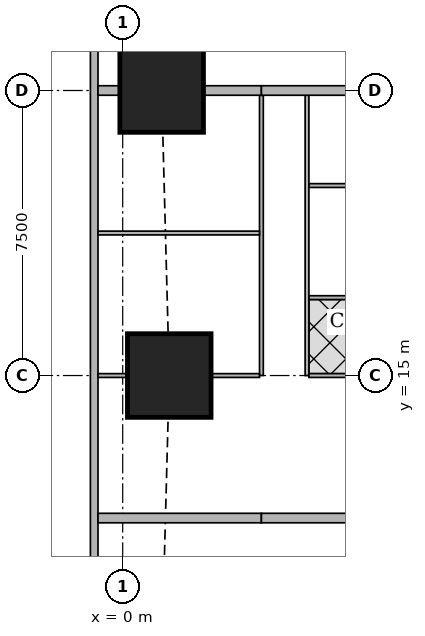
"""IFC4 building model, lengths in metres.
Left out: names, types, materials, properties, quantities, classifications, styles, units other than length and angle.
Written with IfcOpenShell. Run it as: python <this file> out.ifc"""

import sys

from ifc_helpers import new_model, si_unit, direction, frame, frame_2d, origin, origin_2d, place, context, subcontext, project, spatial, rectangle, extrude, element, fill, save


model = new_model("IFC4")
c1 = context("Model", 3, precision=1e-05, world=origin(), true_north=direction((0.0, 1.0)))
c2 = subcontext(c1, "Body", "Model", "MODEL_VIEW")
j1 = project(units=[si_unit("LENGTHUNIT", "METRE"), si_unit("PLANEANGLEUNIT", "RADIAN")], contexts=[c1])
p1 = place(None, origin())
s1 = spatial("IfcSite", under=j1, at=p1, CompositionType="ELEMENT")
p2 = place(p1, origin())
s2 = spatial("IfcBuilding", under=s1, at=p2, CompositionType="ELEMENT")
p3 = place(p2, frame((0.0, 0.0, 111.65)))
s3 = spatial("IfcBuildingStorey", under=s2, at=p3, CompositionType="ELEMENT", Elevation=111.65)
for number, where, z_axis, x_axis in (
    (1, (1.225, 15.0, 0.0), (0.0, 0.0, 1.0), (1.0, 0.0, 0.0)),
    (2, (1.025, 22.5, 0.0), (0.0, 0.0, 1.0), (1.0, 0.0, 0.0)),
):
    element("IfcColumn", number, at=place(p3, frame(where, z_axis=z_axis, x_axis=x_axis)), inside=s3, PredefinedType="COLUMN", context=c2, shape_type="SweptSolid", body=[
        extrude(rectangle(XDim=2.2, YDim=2.2, at=origin_2d()), origin(), (0.0, 0.0, 1.0), 3.75),
    ])
p4 = place(p3, frame((-0.75, 42.837, 0.0), z_axis=(0.0, 0.0, 1.0), x_axis=(0.0, -1.0, 0.0)))
e3 = element("IfcWall", 3, at=p4, inside=s3, PredefinedType="SOLIDWALL", context=c2, shape_type="SweptSolid", body=[
    extrude(rectangle(XDim=40.674, YDim=0.2, at=frame_2d((20.337, 0.0))), origin(), (0.0, 0.0, 1.0), 3.5),
])
p5 = place(p4, frame((1.78, 0.0, 0.9)))
e4 = element("IfcOpeningElement", 4, at=p5, cuts=e3, PredefinedType="OPENING", context=c2, shape_type="SweptSolid", body=[
    extrude(rectangle(XDim=1.8, YDim=1.5, at=frame_2d((0.9, 0.75))), frame((0.0, 0.11, 0.0), z_axis=(0.0, -1.0, 0.0), x_axis=(1.0, 0.0, 0.0)), (0.0, 0.0, 1.0), 0.22),
])
p6 = place(p4, frame((6.312, 0.0, 0.9)))
e5 = element("IfcOpeningElement", 5, at=p6, cuts=e3, PredefinedType="OPENING", context=c2, shape_type="SweptSolid", body=[
    extrude(rectangle(XDim=1.8, YDim=1.5, at=frame_2d((0.9, 0.75))), frame((0.0, 0.11, 0.0), z_axis=(0.0, -1.0, 0.0), x_axis=(1.0, 0.0, 0.0)), (0.0, 0.0, 1.0), 0.22),
])
p7 = place(p4, frame((10.062, 0.0, 0.9)))
e6 = element("IfcOpeningElement", 6, at=p7, cuts=e3, PredefinedType="OPENING", context=c2, shape_type="SweptSolid", body=[
    extrude(rectangle(XDim=1.8, YDim=1.5, at=frame_2d((0.9, 0.75))), frame((0.0, 0.11, 0.0), z_axis=(0.0, -1.0, 0.0), x_axis=(1.0, 0.0, 0.0)), (0.0, 0.0, 1.0), 0.22),
])
p8 = place(p4, frame((13.812, 0.0, 0.9)))
e7 = element("IfcOpeningElement", 7, at=p8, cuts=e3, PredefinedType="OPENING", context=c2, shape_type="SweptSolid", body=[
    extrude(rectangle(XDim=1.8, YDim=1.5, at=frame_2d((0.9, 0.75))), frame((0.0, 0.11, 0.0), z_axis=(0.0, -1.0, 0.0), x_axis=(1.0, 0.0, 0.0)), (0.0, 0.0, 1.0), 0.22),
])
p9 = place(p4, frame((17.562, 0.0, 0.9)))
e8 = element("IfcOpeningElement", 8, at=p9, cuts=e3, PredefinedType="OPENING", context=c2, shape_type="SweptSolid", body=[
    extrude(rectangle(XDim=1.8, YDim=1.5, at=frame_2d((0.9, 0.75))), frame((0.0, 0.11, 0.0), z_axis=(0.0, -1.0, 0.0), x_axis=(1.0, 0.0, 0.0)), (0.0, 0.0, 1.0), 0.22),
])
p10 = place(p4, frame((21.312, 0.0, 0.9)))
e9 = element("IfcOpeningElement", 9, at=p10, cuts=e3, PredefinedType="OPENING", context=c2, shape_type="SweptSolid", body=[
    extrude(rectangle(XDim=1.8, YDim=1.5, at=frame_2d((0.9, 0.75))), frame((0.0, 0.11, 0.0), z_axis=(0.0, -1.0, 0.0), x_axis=(1.0, 0.0, 0.0)), (0.0, 0.0, 1.0), 0.22),
])
p11 = place(p4, frame((25.062, 0.0, 0.9)))
e10 = element("IfcOpeningElement", 10, at=p11, cuts=e3, PredefinedType="OPENING", context=c2, shape_type="SweptSolid", body=[
    extrude(rectangle(XDim=1.8, YDim=1.5, at=frame_2d((0.9, 0.75))), frame((0.0, 0.11, 0.0), z_axis=(0.0, -1.0, 0.0), x_axis=(1.0, 0.0, 0.0)), (0.0, 0.0, 1.0), 0.22),
])
p12 = place(p4, frame((28.812, 0.0, 0.9)))
e11 = element("IfcOpeningElement", 11, at=p12, cuts=e3, PredefinedType="OPENING", context=c2, shape_type="SweptSolid", body=[
    extrude(rectangle(XDim=1.8, YDim=1.5, at=frame_2d((0.9, 0.75))), frame((0.0, 0.11, 0.0), z_axis=(0.0, -1.0, 0.0), x_axis=(1.0, 0.0, 0.0)), (0.0, 0.0, 1.0), 0.22),
])
p13 = place(p4, frame((32.562, 0.0, 0.9)))
e12 = element("IfcOpeningElement", 12, at=p13, cuts=e3, PredefinedType="OPENING", context=c2, shape_type="SweptSolid", body=[
    extrude(rectangle(XDim=1.8, YDim=1.5, at=frame_2d((0.9, 0.75))), frame((0.0, 0.11, 0.0), z_axis=(0.0, -1.0, 0.0), x_axis=(1.0, 0.0, 0.0)), (0.0, 0.0, 1.0), 0.22),
])
p14 = place(p4, frame((37.094, 0.0, 0.9)))
e13 = element("IfcOpeningElement", 13, at=p14, cuts=e3, PredefinedType="OPENING", context=c2, shape_type="SweptSolid", body=[
    extrude(rectangle(XDim=1.8, YDim=1.5, at=frame_2d((0.9, 0.75))), frame((0.0, 0.11, 0.0), z_axis=(0.0, -1.0, 0.0), x_axis=(1.0, 0.0, 0.0)), (0.0, 0.0, 1.0), 0.22),
])
p15 = place(p3, frame((3.65, 15.0, 0.0), z_axis=(0.0, 0.0, 1.0), x_axis=(0.0, 1.0, 0.0)))
e14 = element("IfcWall", 14, at=p15, inside=s3, PredefinedType="PARTITIONING", context=c2, shape_type="SweptSolid", body=[
    extrude(rectangle(XDim=7.375, YDim=0.1, at=frame_2d((3.688, 0.0))), origin(), (0.0, 0.0, 1.0), 3.5),
])
p16 = place(p15, frame((0.2, 0.0, 0.0)))
e15 = element("IfcOpeningElement", 15, at=p16, cuts=e14, PredefinedType="OPENING", context=c2, shape_type="SweptSolid", body=[
    extrude(rectangle(XDim=0.9, YDim=2.1, at=frame_2d((0.45, 1.05))), frame((0.0, 0.06, 0.0), z_axis=(0.0, -1.0, 0.0), x_axis=(1.0, 0.0, 0.0)), (0.0, 0.0, 1.0), 0.12),
])
p17 = place(p15, frame((3.95, 0.0, 0.0)))
e16 = element("IfcOpeningElement", 16, at=p17, cuts=e14, PredefinedType="OPENING", context=c2, shape_type="SweptSolid", body=[
    extrude(rectangle(XDim=0.9, YDim=2.1, at=frame_2d((0.45, 1.05))), frame((0.0, 0.06, 0.0), z_axis=(0.0, -1.0, 0.0), x_axis=(1.0, 0.0, 0.0)), (0.0, 0.0, 1.0), 0.12),
])
p18 = place(p3, frame((4.85, 15.0, 0.0), z_axis=(0.0, 0.0, 1.0), x_axis=(0.0, 1.0, 0.0)))
e17 = element("IfcWall", 17, at=p18, inside=s3, PredefinedType="PARTITIONING", context=c2, shape_type="SweptSolid", body=[
    extrude(rectangle(XDim=7.375, YDim=0.1, at=frame_2d((3.688, 0.0))), origin(), (0.0, 0.0, 1.0), 3.5),
])
p19 = place(p18, frame((0.575, 0.0, 0.0)))
e18 = element("IfcOpeningElement", 18, at=p19, cuts=e17, PredefinedType="OPENING", context=c2, shape_type="SweptSolid", body=[
    extrude(rectangle(XDim=0.9, YDim=2.1, at=frame_2d((0.45, 1.05))), frame((0.0, 0.06, 0.0), z_axis=(0.0, -1.0, 0.0), x_axis=(1.0, 0.0, 0.0)), (0.0, 0.0, 1.0), 0.12),
])
p20 = place(p18, frame((5.799, 0.0, 0.0)))
e19 = element("IfcOpeningElement", 19, at=p20, cuts=e17, PredefinedType="OPENING", context=c2, shape_type="SweptSolid", body=[
    extrude(rectangle(XDim=0.9, YDim=2.1, at=frame_2d((0.45, 1.05))), frame((0.0, 0.06, 0.0), z_axis=(0.0, -1.0, 0.0), x_axis=(1.0, 0.0, 0.0)), (0.0, 0.0, 1.0), 0.12),
])
p21 = place(p18, frame((3.074, 0.0, 0.0)))
e20 = element("IfcOpeningElement", 20, at=p21, cuts=e17, PredefinedType="OPENING", context=c2, shape_type="SweptSolid", body=[
    extrude(rectangle(XDim=0.9, YDim=2.1, at=frame_2d((0.45, 1.05))), frame((0.0, 0.06, 0.0), z_axis=(0.0, -1.0, 0.0), x_axis=(1.0, 0.0, 0.0)), (0.0, 0.0, 1.0), 0.12),
])
p22 = place(p3, frame((-0.65, 15.0, 0.0), z_axis=(0.0, 0.0, 1.0), x_axis=(1.0, 0.0, 0.0)))
e21 = element("IfcWall", 21, at=p22, inside=s3, PredefinedType="PARTITIONING", context=c2, shape_type="SweptSolid", body=[
    extrude(rectangle(XDim=0.774, YDim=0.1, at=frame_2d((0.387, 0.0))), origin(), (0.0, 0.0, 1.0), 3.5),
])
p23 = place(p3, frame((2.326, 15.0, 0.0), z_axis=(0.0, 0.0, 1.0), x_axis=(1.0, 0.0, 0.0)))
e22 = element("IfcWall", 22, at=p23, inside=s3, PredefinedType="PARTITIONING", context=c2, shape_type="SweptSolid", body=[
    extrude(rectangle(XDim=1.274, YDim=0.1, at=frame_2d((0.637, 0.0))), origin(), (0.0, 0.0, 1.0), 3.5),
])
p24 = place(p3, frame((-0.65, 18.75, 0.0), z_axis=(0.0, 0.0, 1.0), x_axis=(1.0, 0.0, 0.0)))
e23 = element("IfcWall", 23, at=p24, inside=s3, PredefinedType="PARTITIONING", context=c2, shape_type="SweptSolid", body=[
    extrude(rectangle(XDim=4.25, YDim=0.1, at=frame_2d((2.125, 0.0))), origin(), (0.0, 0.0, 1.0), 2.2),
])
p25 = place(p3, frame((4.9, 15.0, 0.0), z_axis=(0.0, 0.0, 1.0), x_axis=(1.0, 0.0, 0.0)))
e24 = element("IfcWall", 24, at=p25, inside=s3, PredefinedType="PARTITIONING", context=c2, shape_type="SweptSolid", body=[
    extrude(rectangle(XDim=1.499, YDim=0.1, at=frame_2d((0.75, 0.0))), origin(), (0.0, 0.0, 1.0), 3.5),
])
for number, where, z_axis, x_axis in (
    (25, (4.9, 19.999, 0.0), (0.0, 0.0, 1.0), (1.0, 0.0, 0.0)),
    (26, (4.9, 17.05, 0.0), (0.0, 0.0, 1.0), (1.0, 0.0, 0.0)),
):
    element("IfcWall", number, at=place(p3, frame(where, z_axis=z_axis, x_axis=x_axis)), inside=s3, PredefinedType="PARTITIONING", context=c2, shape_type="SweptSolid", body=[
        extrude(rectangle(XDim=3.525, YDim=0.1, at=frame_2d((1.763, 0.0))), origin(), (0.0, 0.0, 1.0), 3.5),
    ])
p26 = place(p3, frame((-0.65, 11.25, 0.0), z_axis=(0.0, 0.0, 1.0), x_axis=(1.0, 0.0, 0.0)))
e27 = element("IfcWall", 27, at=p26, inside=s3, PredefinedType="SOLIDWALL", context=c2, shape_type="SweptSolid", body=[
    extrude(rectangle(XDim=4.3, YDim=0.25, at=frame_2d((2.15, 0.0))), origin(), (0.0, 0.0, 1.0), 2.2),
])
p27 = place(p3, frame((3.65, 11.25, 0.0), z_axis=(0.0, 0.0, 1.0), x_axis=(1.0, 0.0, 0.0)))
e28 = element("IfcWall", 28, at=p27, inside=s3, PredefinedType="SOLIDWALL", context=c2, shape_type="SweptSolid", body=[
    extrude(rectangle(XDim=4.775, YDim=0.25, at=frame_2d((2.388, 0.0))), origin(), (0.0, 0.0, 1.0), 3.5),
])
p28 = place(p3, frame((-0.65, 22.5, 0.0), z_axis=(0.0, 0.0, 1.0), x_axis=(1.0, 0.0, 0.0)))
e29 = element("IfcWall", 29, at=p28, inside=s3, PredefinedType="SOLIDWALL", context=c2, shape_type="SweptSolid", body=[
    extrude(rectangle(XDim=0.574, YDim=0.25, at=frame_2d((0.287, 0.0))), origin(), (0.0, 0.0, 1.0), 3.5),
])
p29 = place(p3, frame((2.126, 22.5, 0.0), z_axis=(0.0, 0.0, 1.0), x_axis=(1.0, 0.0, 0.0)))
e30 = element("IfcWall", 30, at=p29, inside=s3, PredefinedType="SOLIDWALL", context=c2, shape_type="SweptSolid", body=[
    extrude(rectangle(XDim=1.524, YDim=0.25, at=frame_2d((0.762, 0.0))), origin(), (0.0, 0.0, 1.0), 3.5),
])
p30 = place(p3, frame((3.65, 22.5, 0.0), z_axis=(0.0, 0.0, 1.0), x_axis=(1.0, 0.0, 0.0)))
e31 = element("IfcWall", 31, at=p30, inside=s3, PredefinedType="SOLIDWALL", context=c2, shape_type="SweptSolid", body=[
    extrude(rectangle(XDim=2.749, YDim=0.25, at=frame_2d((1.375, 0.0))), origin(), (0.0, 0.0, 1.0), 3.5),
])
p31 = place(p9, origin())
e32 = element("IfcWindow", 32, at=p31, inside=s3, PartitioningType="SINGLE_PANEL", PredefinedType="WINDOW", context=c2, shape_type="SweptSolid", body=[
    extrude(rectangle(XDim=1.8, YDim=1.5, at=frame_2d((0.9, 0.75))), frame((0.0, 0.03, 0.0), z_axis=(0.0, -1.0, 0.0), x_axis=(1.0, 0.0, 0.0)), (0.0, 0.0, 1.0), 0.06),
])
fill(e8, e32)
p32 = place(p10, origin())
e33 = element("IfcWindow", 33, at=p32, inside=s3, PartitioningType="SINGLE_PANEL", PredefinedType="WINDOW", context=c2, shape_type="SweptSolid", body=[
    extrude(rectangle(XDim=1.8, YDim=1.5, at=frame_2d((0.9, 0.75))), frame((0.0, 0.03, 0.0), z_axis=(0.0, -1.0, 0.0), x_axis=(1.0, 0.0, 0.0)), (0.0, 0.0, 1.0), 0.06),
])
fill(e9, e33)
p33 = place(p11, origin())
e34 = element("IfcWindow", 34, at=p33, inside=s3, PartitioningType="SINGLE_PANEL", PredefinedType="WINDOW", context=c2, shape_type="SweptSolid", body=[
    extrude(rectangle(XDim=1.8, YDim=1.5, at=frame_2d((0.9, 0.75))), frame((0.0, 0.03, 0.0), z_axis=(0.0, -1.0, 0.0), x_axis=(1.0, 0.0, 0.0)), (0.0, 0.0, 1.0), 0.06),
])
fill(e10, e34)
p34 = place(p12, origin())
e35 = element("IfcWindow", 35, at=p34, inside=s3, PartitioningType="SINGLE_PANEL", PredefinedType="WINDOW", context=c2, shape_type="SweptSolid", body=[
    extrude(rectangle(XDim=1.8, YDim=1.5, at=frame_2d((0.9, 0.75))), frame((0.0, 0.03, 0.0), z_axis=(0.0, -1.0, 0.0), x_axis=(1.0, 0.0, 0.0)), (0.0, 0.0, 1.0), 0.06),
])
fill(e11, e35)
p35 = place(p13, origin())
e36 = element("IfcWindow", 36, at=p35, inside=s3, PartitioningType="SINGLE_PANEL", PredefinedType="WINDOW", context=c2, shape_type="SweptSolid", body=[
    extrude(rectangle(XDim=1.8, YDim=1.5, at=frame_2d((0.9, 0.75))), frame((0.0, 0.03, 0.0), z_axis=(0.0, -1.0, 0.0), x_axis=(1.0, 0.0, 0.0)), (0.0, 0.0, 1.0), 0.06),
])
fill(e12, e36)
p36 = place(p16, origin())
e37 = element("IfcDoor", 37, at=p36, inside=s3, OperationType="SINGLE_SWING_LEFT", PredefinedType="DOOR", context=c2, shape_type="SweptSolid", body=[
    extrude(rectangle(XDim=0.9, YDim=2.1, at=frame_2d((0.45, 1.05))), frame((0.0, 0.025, 0.0), z_axis=(0.0, -1.0, 0.0), x_axis=(1.0, 0.0, 0.0)), (0.0, 0.0, 1.0), 0.05),
])
fill(e15, e37)
p37 = place(p17, origin())
e38 = element("IfcDoor", 38, at=p37, inside=s3, OperationType="SINGLE_SWING_LEFT", PredefinedType="DOOR", context=c2, shape_type="SweptSolid", body=[
    extrude(rectangle(XDim=0.9, YDim=2.1, at=frame_2d((0.45, 1.05))), frame((0.0, 0.025, 0.0), z_axis=(0.0, -1.0, 0.0), x_axis=(1.0, 0.0, 0.0)), (0.0, 0.0, 1.0), 0.05),
])
fill(e16, e38)
p38 = place(p19, origin())
e39 = element("IfcDoor", 39, at=p38, inside=s3, OperationType="SINGLE_SWING_RIGHT", PredefinedType="DOOR", context=c2, shape_type="SweptSolid", body=[
    extrude(rectangle(XDim=0.9, YDim=2.1, at=frame_2d((0.45, 1.05))), frame((0.0, 0.025, 0.0), z_axis=(0.0, -1.0, 0.0), x_axis=(1.0, 0.0, 0.0)), (0.0, 0.0, 1.0), 0.05),
])
fill(e18, e39)
p39 = place(p20, origin())
e40 = element("IfcDoor", 40, at=p39, inside=s3, OperationType="SINGLE_SWING_LEFT", PredefinedType="DOOR", context=c2, shape_type="SweptSolid", body=[
    extrude(rectangle(XDim=0.9, YDim=2.1, at=frame_2d((0.45, 1.05))), frame((0.0, 0.025, 0.0), z_axis=(0.0, -1.0, 0.0), x_axis=(1.0, 0.0, 0.0)), (0.0, 0.0, 1.0), 0.05),
])
fill(e19, e40)
p40 = place(p21, origin())
e41 = element("IfcDoor", 41, at=p40, inside=s3, OperationType="SINGLE_SWING_LEFT", PredefinedType="DOOR", context=c2, shape_type="SweptSolid", body=[
    extrude(rectangle(XDim=0.9, YDim=2.1, at=frame_2d((0.45, 1.05))), frame((0.0, 0.025, 0.0), z_axis=(0.0, -1.0, 0.0), x_axis=(1.0, 0.0, 0.0)), (0.0, 0.0, 1.0), 0.05),
])
fill(e20, e41)
save(model, sys.argv[1])
